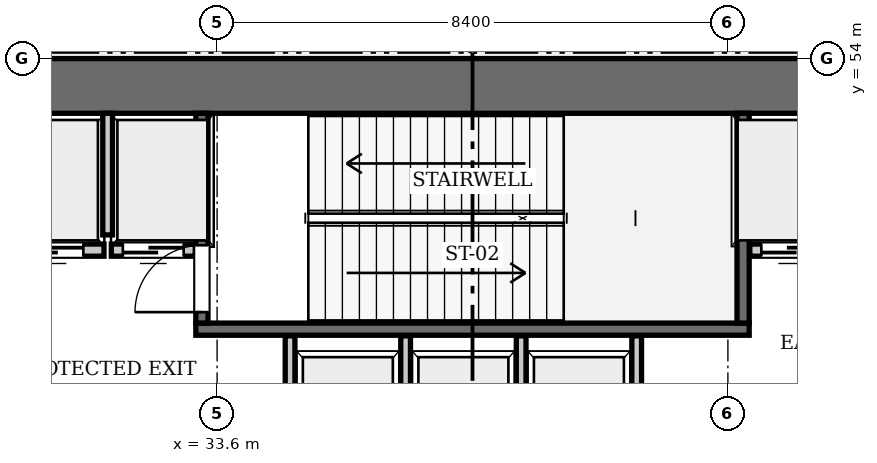
"""IFC4 building model, lengths in metres.
Left out: names, types, materials, properties, quantities, classifications, styles, units other than length and angle.
Written with IfcOpenShell. Run it as: python <this file> out.ifc"""

import sys

from ifc_helpers import new_model, si_unit, direction, frame, frame_2d, origin, place, context, subcontext, project, spatial, rectangle, extrude, element, fill, save


model = new_model("IFC4")
c1 = context("Model", 3, precision=1e-05, world=origin(), true_north=direction((0.0, 1.0)))
c2 = subcontext(c1, "Body", "Model", "MODEL_VIEW")
j1 = project(units=[si_unit("LENGTHUNIT", "METRE"), si_unit("PLANEANGLEUNIT", "RADIAN")], contexts=[c1])
p1 = place(None, origin())
s1 = spatial("IfcSite", under=j1, at=p1, CompositionType="ELEMENT")
p2 = place(p1, origin())
s2 = spatial("IfcBuilding", under=s1, at=p2, CompositionType="ELEMENT")
p3 = place(p2, origin())
s3 = spatial("IfcBuildingStorey", under=s2, at=p3, CompositionType="ELEMENT", Elevation=0.0)
p4 = place(p3, frame((25.2, 53.55, 0.0), z_axis=(0.0, 0.0, 1.0), x_axis=(1.0, 0.0, 0.0)))
e1 = element("IfcWall", 1, at=p4, inside=s3, PredefinedType="SHEAR", context=c2, shape_type="SweptSolid", body=[
    extrude(rectangle(XDim=25.2, YDim=0.9, at=frame_2d((12.6, 0.0))), origin(), (0.0, 0.0, 1.0), 5.6),
])
p5 = place(p3, frame((33.25, 49.55, 0.0), z_axis=(0.0, 0.0, 1.0), x_axis=(1.0, 0.0, 0.0)))
e2 = element("IfcWall", 2, at=p5, inside=s3, PredefinedType="SOLIDWALL", context=c2, shape_type="SweptSolid", body=[
    extrude(rectangle(XDim=9.1, YDim=0.2, at=frame_2d((4.55, 0.0))), origin(), (0.0, 0.0, 1.0), 5.32),
])
p6 = place(p3, frame((42.25, 49.65, 0.0), z_axis=(0.0, 0.0, 1.0), x_axis=(0.0, 1.0, 0.0)))
e3 = element("IfcWall", 3, at=p6, inside=s3, PredefinedType="SOLIDWALL", context=c2, shape_type="SweptSolid", body=[
    extrude(rectangle(XDim=3.45, YDim=0.2, at=frame_2d((1.725, 0.0))), origin(), (0.0, 0.0, 1.0), 5.32),
])
p7 = place(p3, frame((33.35, 49.65, 0.0), z_axis=(0.0, 0.0, 1.0), x_axis=(0.0, 1.0, 0.0)))
e4 = element("IfcWall", 4, at=p7, inside=s3, PredefinedType="SOLIDWALL", context=c2, shape_type="SweptSolid", body=[
    extrude(rectangle(XDim=3.45, YDim=0.2, at=frame_2d((1.725, 0.0))), origin(), (0.0, 0.0, 1.0), 5.32),
])
p8 = place(p7, frame((0.18, 0.0, 0.0)))
e5 = element("IfcOpeningElement", 5, at=p8, cuts=e4, PredefinedType="OPENING", context=c2, shape_type="SweptSolid", body=[
    extrude(rectangle(XDim=1.1, YDim=2.15, at=frame_2d((0.55, 1.075))), frame((0.0, 0.11, 0.0), z_axis=(0.0, -1.0, 0.0), x_axis=(1.0, 0.0, 0.0)), (0.0, 0.0, 1.0), 0.22),
])
p9 = place(p3, frame((30.06, 50.85, 0.0), z_axis=(0.0, 0.0, 1.0), x_axis=(1.0, 0.0, 0.0)))
e6 = element("IfcWall", 6, at=p9, inside=s3, PredefinedType="SOLIDWALL", context=c2, shape_type="SweptSolid", body=[
    extrude(rectangle(XDim=1.68, YDim=0.2, at=frame_2d((0.84, 0.0))), origin(), (0.0, 0.0, 1.0), 5.32),
])
p10 = place(p9, frame((0.34, 0.0, 0.0)))
e7 = element("IfcOpeningElement", 7, at=p10, cuts=e6, PredefinedType="OPENING", context=c2, shape_type="SweptSolid", body=[
    extrude(rectangle(XDim=1.0, YDim=2.15, at=frame_2d((0.5, 1.075))), frame((0.0, 0.11, 0.0), z_axis=(0.0, -1.0, 0.0), x_axis=(1.0, 0.0, 0.0)), (0.0, 0.0, 1.0), 0.22),
])
p11 = place(p3, frame((31.86, 50.85, 0.0), z_axis=(0.0, 0.0, 1.0), x_axis=(1.0, 0.0, 0.0)))
e8 = element("IfcWall", 8, at=p11, inside=s3, PredefinedType="SOLIDWALL", context=c2, shape_type="SweptSolid", body=[
    extrude(rectangle(XDim=1.38, YDim=0.2, at=frame_2d((0.69, 0.0))), origin(), (0.0, 0.0, 1.0), 5.32),
])
p12 = place(p11, frame((0.19, 0.0, 0.0)))
e9 = element("IfcOpeningElement", 9, at=p12, cuts=e8, PredefinedType="OPENING", context=c2, shape_type="SweptSolid", body=[
    extrude(rectangle(XDim=1.0, YDim=2.15, at=frame_2d((0.5, 1.075))), frame((0.0, 0.11, 0.0), z_axis=(0.0, -1.0, 0.0), x_axis=(1.0, 0.0, 0.0)), (0.0, 0.0, 1.0), 0.22),
])
p13 = place(p3, frame((42.36, 50.85, 0.0), z_axis=(0.0, 0.0, 1.0), x_axis=(1.0, 0.0, 0.0)))
e10 = element("IfcWall", 10, at=p13, inside=s3, PredefinedType="SOLIDWALL", context=c2, shape_type="SweptSolid", body=[
    extrude(rectangle(XDim=1.38, YDim=0.2, at=frame_2d((0.69, 0.0))), origin(), (0.0, 0.0, 1.0), 5.32),
])
p14 = place(p13, frame((0.19, 0.0, 0.0)))
e11 = element("IfcOpeningElement", 11, at=p14, cuts=e10, PredefinedType="OPENING", context=c2, shape_type="SweptSolid", body=[
    extrude(rectangle(XDim=1.0, YDim=2.15, at=frame_2d((0.5, 1.075))), frame((0.0, 0.11, 0.0), z_axis=(0.0, -1.0, 0.0), x_axis=(1.0, 0.0, 0.0)), (0.0, 0.0, 1.0), 0.22),
])
p15 = place(p3, frame((31.8, 51.1, 0.0), z_axis=(0.0, 0.0, 1.0), x_axis=(0.0, 1.0, 0.0)))
e12 = element("IfcWall", 12, at=p15, inside=s3, PredefinedType="SOLIDWALL", context=c2, shape_type="SweptSolid", body=[
    extrude(rectangle(XDim=2.0, YDim=0.16, at=frame_2d((1.0, 0.0))), origin(), (0.0, 0.0, 1.0), 5.32),
])
for number, where, z_axis, x_axis in (
    (13, (34.8, 47.25, 0.0), (0.0, 0.0, 1.0), (0.0, 1.0, 0.0)),
    (14, (36.7, 47.25, 0.0), (0.0, 0.0, 1.0), (0.0, 1.0, 0.0)),
    (15, (38.6, 47.25, 0.0), (0.0, 0.0, 1.0), (0.0, 1.0, 0.0)),
    (16, (40.5, 47.25, 0.0), (0.0, 0.0, 1.0), (0.0, 1.0, 0.0)),
):
    element("IfcWall", number, at=place(p3, frame(where, z_axis=z_axis, x_axis=x_axis)), inside=s3, PredefinedType="SOLIDWALL", context=c2, shape_type="SweptSolid", body=[
        extrude(rectangle(XDim=2.19, YDim=0.16, at=frame_2d((1.095, 0.0))), origin(), (0.0, 0.0, 1.0), 5.32),
    ])
p16 = place(p8, origin())
e17 = element("IfcDoor", 17, at=p16, inside=s3, OperationType="SINGLE_SWING_LEFT", PredefinedType="DOOR", context=c2, shape_type="SweptSolid", body=[
    extrude(rectangle(XDim=1.1, YDim=2.15, at=frame_2d((0.55, 1.075))), frame((0.0, 0.025, 0.0), z_axis=(0.0, -1.0, 0.0), x_axis=(1.0, 0.0, 0.0)), (0.0, 0.0, 1.0), 0.05),
])
fill(e5, e17)
p17 = place(p10, frame((1.0, 0.0, 0.0), z_axis=(0.0, 0.0, 1.0), x_axis=(-1.0, 0.0, 0.0)))
e18 = element("IfcDoor", 18, at=p17, inside=s3, OperationType="SLIDING_TO_LEFT", PredefinedType="DOOR", context=c2, shape_type="SweptSolid", body=[
    extrude(rectangle(XDim=1.0, YDim=2.15, at=frame_2d((0.5, 1.075))), frame((0.0, 0.025, 0.0), z_axis=(0.0, -1.0, 0.0), x_axis=(1.0, 0.0, 0.0)), (0.0, 0.0, 1.0), 0.05),
])
fill(e7, e18)
p18 = place(p12, frame((1.0, 0.0, 0.0), z_axis=(0.0, 0.0, 1.0), x_axis=(-1.0, 0.0, 0.0)))
e19 = element("IfcDoor", 19, at=p18, inside=s3, OperationType="SLIDING_TO_LEFT", PredefinedType="DOOR", context=c2, shape_type="SweptSolid", body=[
    extrude(rectangle(XDim=1.0, YDim=2.15, at=frame_2d((0.5, 1.075))), frame((0.0, 0.025, 0.0), z_axis=(0.0, -1.0, 0.0), x_axis=(1.0, 0.0, 0.0)), (0.0, 0.0, 1.0), 0.05),
])
fill(e9, e19)
p19 = place(p14, frame((1.0, 0.0, 0.0), z_axis=(0.0, 0.0, 1.0), x_axis=(-1.0, 0.0, 0.0)))
e20 = element("IfcDoor", 20, at=p19, inside=s3, OperationType="SLIDING_TO_LEFT", PredefinedType="DOOR", context=c2, shape_type="SweptSolid", body=[
    extrude(rectangle(XDim=1.0, YDim=2.15, at=frame_2d((0.5, 1.075))), frame((0.0, 0.025, 0.0), z_axis=(0.0, -1.0, 0.0), x_axis=(1.0, 0.0, 0.0)), (0.0, 0.0, 1.0), 0.05),
])
fill(e11, e20)
save(model, sys.argv[1])
